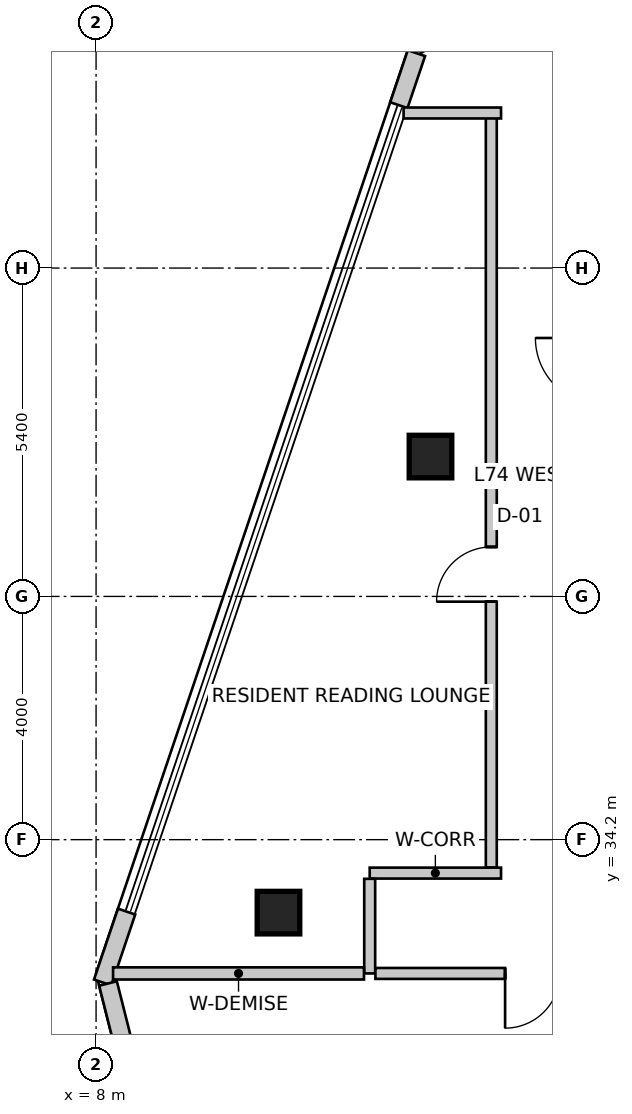
"""IFC4 building model, lengths in metres.
Left out: names, types, materials, properties, quantities, classifications, styles, units other than length and angle.
Written with IfcOpenShell. Run it as: python <this file> out.ifc"""

import sys

from ifc_helpers import new_model, si_unit, direction, frame, frame_2d, origin, origin_2d, place, context, subcontext, project, spatial, rectangle, extrude, source, transform, mapped, element, fill, save


model = new_model("IFC4")
c1 = context("Model", 3, precision=1e-05, world=origin(), true_north=direction((0.0, 1.0)))
c2 = subcontext(c1, "Body", "Model", "MODEL_VIEW")
j1 = project(units=[si_unit("LENGTHUNIT", "METRE"), si_unit("PLANEANGLEUNIT", "RADIAN")], contexts=[c1])
p1 = place(None, origin())
s1 = spatial("IfcSite", under=j1, at=p1, CompositionType="ELEMENT")
p2 = place(p1, origin())
s2 = spatial("IfcBuilding", under=s1, at=p2, CompositionType="ELEMENT")
p3 = place(p2, frame((0.0, 0.0, 288.9)))
s3 = spatial("IfcBuildingStorey", under=s2, at=p3, CompositionType="ELEMENT", Elevation=288.9)
m1 = source(origin(), c2, "Body", "SweptSolid", [
    extrude(rectangle(XDim=0.7, YDim=0.7, at=origin_2d()), origin(), (0.0, 0.0, 1.0), 3.6),
])
for number, where, z_axis, x_axis in (
    (1, (11.0, 33.0, 0.0), (0.0, 0.0, 1.0), (1.0, 0.0, 0.0)),
    (2, (13.5, 40.5, 0.0), (0.0, 0.0, 1.0), (1.0, 0.0, 0.0)),
):
    element("IfcColumn", number, at=place(p3, frame(where, z_axis=z_axis, x_axis=x_axis)), inside=s3, PredefinedType="COLUMN", context=c2, shape_type="MappedRepresentation", body=[
        mapped(m1, transform((0.0, 0.0, 0.0), scale=1.0)),
    ])
p4 = place(p3, frame((21.873, 52.741, 0.0), z_axis=(0.0, 0.0, 1.0), x_axis=(-0.843661487732, -0.536875492193, 0.0)))
e3 = element("IfcWall", 3, at=p4, inside=s3, PredefinedType="SOLIDWALL", context=c2, shape_type="SweptSolid", body=[
    extrude(rectangle(XDim=10.282, YDim=0.3, at=frame_2d((5.141, 0.0))), origin(), (0.0, 0.0, 1.0), 3.35),
])
m2 = source(origin(), c2, "Body", "SweptSolid", [
    extrude(rectangle(XDim=2.1, YDim=2.0, at=frame_2d((1.05, 1.0))), frame((0.0, 0.16, 0.0), z_axis=(0.0, -1.0, 0.0), x_axis=(1.0, 0.0, 0.0)), (0.0, 0.0, 1.0), 0.32),
])
p5 = place(p4, frame((1.41, 0.0, 0.85)))
e4 = element("IfcOpeningElement", 4, at=p5, cuts=e3, PredefinedType="OPENING", context=c2, shape_type="MappedRepresentation", body=[
    mapped(m2, transform((0.0, 0.0, 0.0), scale=1.0)),
])
m3 = source(origin(), c2, "Body", "SweptSolid", [
    extrude(rectangle(XDim=2.4, YDim=2.2, at=frame_2d((1.2, 1.1))), frame((0.0, 0.16, 0.0), z_axis=(0.0, -1.0, 0.0), x_axis=(1.0, 0.0, 0.0)), (0.0, 0.0, 1.0), 0.32),
])
p6 = place(p4, frame((5.539, 0.0, 0.85)))
e5 = element("IfcOpeningElement", 5, at=p6, cuts=e3, PredefinedType="OPENING", context=c2, shape_type="MappedRepresentation", body=[
    mapped(m3, transform((0.0, 0.0, 0.0), scale=1.0)),
])
p7 = place(p3, frame((13.269, 47.134, 0.0), z_axis=(0.0, 0.0, 1.0), x_axis=(-0.31995770778, -0.947431826166, 0.0)))
e6 = element("IfcWall", 6, at=p7, inside=s3, PredefinedType="SOLIDWALL", context=c2, shape_type="SweptSolid", body=[
    extrude(rectangle(XDim=0.903, YDim=0.3, at=frame_2d((0.451, 0.0))), origin(), (0.0, 0.0, 1.0), 3.35),
])
p8 = place(p3, frame((8.502, 33.017, 0.0), z_axis=(0.0, 0.0, 1.0), x_axis=(-0.319798692732, -0.947485512357, 0.0)))
e7 = element("IfcWall", 7, at=p8, inside=s3, PredefinedType="SOLIDWALL", context=c2, shape_type="SweptSolid", body=[
    extrude(rectangle(XDim=1.23, YDim=0.3, at=frame_2d((0.615, 0.0))), origin(), (0.0, 0.0, 1.0), 3.35),
])
p9 = place(p3, frame((8.196, 31.835, 0.0), z_axis=(0.0, 0.0, 1.0), x_axis=(0.244430846523, -0.969666726906, 0.0)))
e8 = element("IfcWall", 8, at=p9, inside=s3, PredefinedType="SOLIDWALL", context=c2, shape_type="SweptSolid", body=[
    extrude(rectangle(XDim=7.152, YDim=0.3, at=frame_2d((3.576, 0.0))), origin(), (0.0, 0.0, 1.0), 3.35),
])
p10 = place(p9, frame((1.568, 0.0, 0.85)))
e9 = element("IfcOpeningElement", 9, at=p10, cuts=e8, PredefinedType="OPENING", context=c2, shape_type="MappedRepresentation", body=[
    mapped(m2, transform((0.0, 0.0, 0.0), scale=1.0)),
])
m4 = source(origin(), c2, "Body", "SweptSolid", [
    extrude(rectangle(XDim=0.9, YDim=1.6, at=frame_2d((0.45, 0.8))), frame((0.0, 0.16, 0.0), z_axis=(0.0, -1.0, 0.0), x_axis=(1.0, 0.0, 0.0)), (0.0, 0.0, 1.0), 0.32),
])
p11 = place(p9, frame((5.643, 0.0, 0.85)))
e10 = element("IfcOpeningElement", 10, at=p11, cuts=e8, PredefinedType="OPENING", context=c2, shape_type="MappedRepresentation", body=[
    mapped(m4, transform((0.0, 0.0, 0.0), scale=1.0)),
])
p12 = place(p3, frame((12.5, 33.65, 0.0), z_axis=(0.0, 0.0, 1.0), x_axis=(1.0, 0.0, 0.0)))
e11 = element("IfcWall", 11, at=p12, inside=s3, PredefinedType="PARTITIONING", context=c2, shape_type="SweptSolid", body=[
    extrude(rectangle(XDim=2.16, YDim=0.18, at=frame_2d((1.08, 0.0))), origin(), (0.0, 0.0, 1.0), 3.35),
])
p13 = place(p3, frame((12.5, 32.0, 0.0), z_axis=(0.0, 0.0, 1.0), x_axis=(0.0, 1.0, 0.0)))
e12 = element("IfcWall", 12, at=p13, inside=s3, PredefinedType="PARTITIONING", context=c2, shape_type="SweptSolid", body=[
    extrude(rectangle(XDim=1.556, YDim=0.18, at=frame_2d((0.778, 0.0))), origin(), (0.0, 0.0, 1.0), 3.034),
])
p14 = place(p3, frame((17.636, 32.0, 0.0), z_axis=(0.0, 0.0, 1.0), x_axis=(-1.0, 0.0, 0.0)))
e13 = element("IfcWall", 13, at=p14, inside=s3, PredefinedType="PARTITIONING", context=c2, shape_type="SweptSolid", body=[
    extrude(rectangle(XDim=5.042, YDim=0.18, at=frame_2d((2.521, 0.0))), origin(), (0.0, 0.0, 1.0), 3.034),
])
m5 = source(origin(), c2, "Body", "SweptSolid", [
    extrude(rectangle(XDim=0.9, YDim=2.15, at=frame_2d((0.45, 1.075))), frame((0.0, 0.1, 0.0), z_axis=(0.0, -1.0, 0.0), x_axis=(1.0, 0.0, 0.0)), (0.0, 0.0, 1.0), 0.2),
])
p15 = place(p14, frame((2.009, 0.0, 0.0)))
e14 = element("IfcOpeningElement", 14, at=p15, cuts=e13, PredefinedType="OPENING", context=c2, shape_type="MappedRepresentation", body=[
    mapped(m5, transform((0.0, 0.0, 0.0), scale=1.0)),
])
p16 = place(p3, frame((14.5, 33.744, 0.0), z_axis=(0.0, 0.0, 1.0), x_axis=(0.0, 1.0, 0.0)))
e15 = element("IfcWall", 15, at=p16, inside=s3, PredefinedType="PARTITIONING", context=c2, shape_type="SweptSolid", body=[
    extrude(rectangle(XDim=12.406, YDim=0.18, at=frame_2d((6.203, 0.0))), origin(), (0.0, 0.0, 1.0), 3.35),
])
p17 = place(p16, frame((4.37, 0.0, 0.0)))
e16 = element("IfcOpeningElement", 16, at=p17, cuts=e15, PredefinedType="OPENING", context=c2, shape_type="MappedRepresentation", body=[
    mapped(m5, transform((0.0, 0.0, 0.0), scale=1.0)),
])
p18 = place(p3, frame((14.66, 46.15, 0.0), z_axis=(0.0, 0.0, 1.0), x_axis=(-1.0, 0.0, 0.0)))
e17 = element("IfcWall", 17, at=p18, inside=s3, PredefinedType="PARTITIONING", context=c2, shape_type="SweptSolid", body=[
    extrude(rectangle(XDim=1.602, YDim=0.18, at=frame_2d((0.801, 0.0))), origin(), (0.0, 0.0, 1.0), 3.35),
])
p19 = place(p3, frame((12.406, 32.0, 0.0), z_axis=(0.0, 0.0, 1.0), x_axis=(-1.0, 0.0, 0.0)))
e18 = element("IfcWall", 18, at=p19, inside=s3, PredefinedType="PARTITIONING", context=c2, shape_type="SweptSolid", body=[
    extrude(rectangle(XDim=4.126, YDim=0.2, at=frame_2d((2.063, 0.0))), origin(), (0.0, 0.0, 1.0), 2.642),
])
m6 = source(origin(), c2, "Body", "SweptSolid", [
    extrude(rectangle(XDim=0.9, YDim=2.15, at=frame_2d((0.45, 1.075))), frame((0.0, 0.025, 0.0), z_axis=(0.0, -1.0, 0.0), x_axis=(1.0, 0.0, 0.0)), (0.0, 0.0, 1.0), 0.05),
])
p20 = place(p17, origin())
e19 = element("IfcDoor", 19, at=p20, inside=s3, OperationType="SINGLE_SWING_LEFT", PredefinedType="DOOR", context=c2, shape_type="MappedRepresentation", body=[
    mapped(m6, transform((0.0, 0.0, 0.0), scale=1.0)),
])
fill(e16, e19)
m7 = source(origin(), c2, "Body", "SweptSolid", [
    extrude(rectangle(XDim=0.9, YDim=2.15, at=frame_2d((0.45, 1.075))), frame((0.0, 0.025, 0.0), z_axis=(0.0, -1.0, 0.0), x_axis=(1.0, 0.0, 0.0)), (0.0, 0.0, 1.0), 0.05),
])
p21 = place(p15, origin())
e20 = element("IfcDoor", 20, at=p21, inside=s3, OperationType="SINGLE_SWING_RIGHT", PredefinedType="DOOR", context=c2, shape_type="MappedRepresentation", body=[
    mapped(m7, transform((0.0, 0.0, 0.0), scale=1.0)),
])
fill(e14, e20)
save(model, sys.argv[1])
